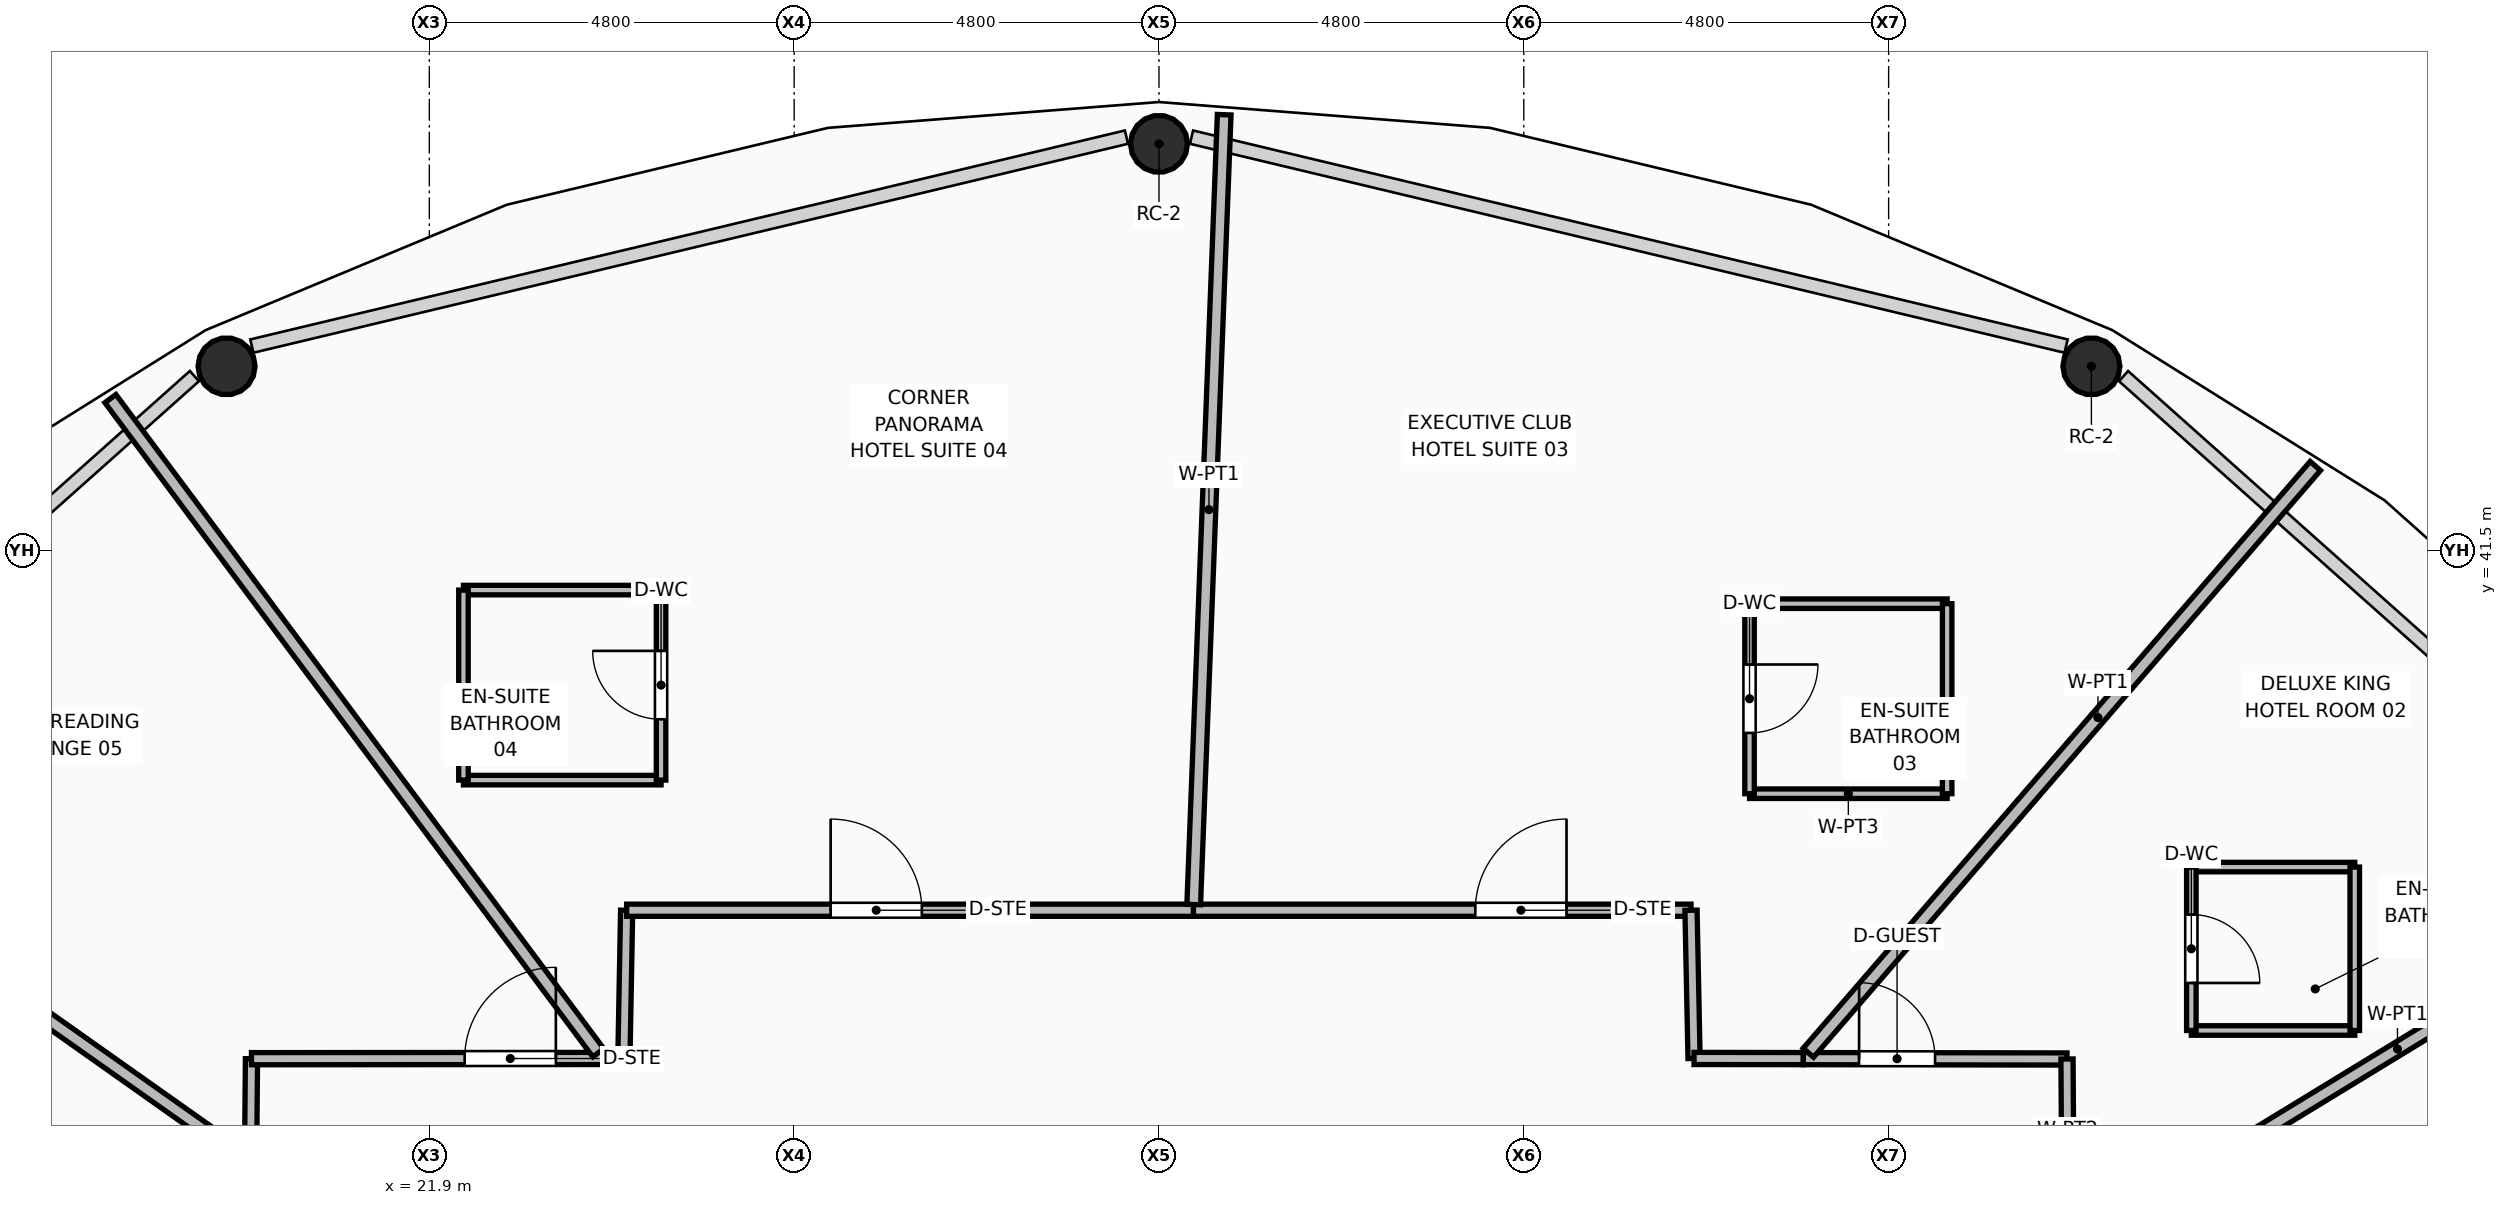
"""IFC4 building model, lengths in metres.
Left out: names, types, materials, properties, quantities, classifications, styles, units other than length and angle.
Written with IfcOpenShell. Run it as: python <this file> out.ifc"""

import sys

from ifc_helpers import new_model, si_unit, direction, frame, frame_2d, origin, origin_2d, place, context, subcontext, project, spatial, rectangle, hollow_circle, extrude, element, fill, save


model = new_model("IFC4")
c1 = context("Model", 3, precision=1e-05, world=origin(), true_north=direction((0.0, 1.0)))
c2 = subcontext(c1, "Body", "Model", "MODEL_VIEW")
j1 = project(units=[si_unit("LENGTHUNIT", "METRE"), si_unit("PLANEANGLEUNIT", "RADIAN")], contexts=[c1])
p1 = place(None, origin())
s1 = spatial("IfcSite", under=j1, at=p1, CompositionType="ELEMENT")
p2 = place(p1, origin())
s2 = spatial("IfcBuilding", under=s1, at=p2, CompositionType="ELEMENT")
p3 = place(p2, frame((0.0, 0.0, 164.7)))
s3 = spatial("IfcBuildingStorey", under=s2, at=p3, CompositionType="ELEMENT", Elevation=164.7)
for number, where, z_axis, x_axis in (
    (1, (43.768, 43.921, 0.0), (0.0, 0.0, 1.0), (1.0, 0.0, 0.0)),
    (2, (31.5, 46.848, 0.0), (0.0, 0.0, 1.0), (1.0, 0.0, 0.0)),
    (3, (19.232, 43.921, 0.0), (0.0, 0.0, 1.0), (1.0, 0.0, 0.0)),
):
    element("IfcColumn", number, at=place(p3, frame(where, z_axis=z_axis, x_axis=x_axis)), inside=s3, PredefinedType="COLUMN", context=c2, shape_type="SweptSolid", body=[
        extrude(hollow_circle(Radius=0.375, WallThickness=0.035, at=origin_2d()), origin(), (0.0, 0.0, 1.0), 3.57),
    ])
p4 = place(p3, frame((19.548, 33.445, 0.0), z_axis=(0.0, 0.0, 1.0), x_axis=(0.008751227658, 0.999961707274, 0.0)))
e4 = element("IfcWall", 4, at=p4, inside=s3, PredefinedType="PARTITIONING", context=c2, shape_type="SweptSolid", body=[
    extrude(rectangle(XDim=1.367, YDim=0.16, at=frame_2d((0.684, 0.0))), origin(), (0.0, 0.0, 1.0), 3.55),
])
p5 = place(p3, frame((19.56, 34.812, 0.0), z_axis=(0.0, 0.0, 1.0), x_axis=(0.999999821253, 0.000597907217, 0.0)))
e5 = element("IfcWall", 5, at=p5, inside=s3, PredefinedType="PARTITIONING", context=c2, shape_type="SweptSolid", body=[
    extrude(rectangle(XDim=4.9, YDim=0.16, at=frame_2d((2.45, 0.0))), origin(), (0.0, 0.0, 1.0), 3.006),
])
p6 = place(p5, frame((2.805, 0.0, 0.0)))
e6 = element("IfcOpeningElement", 6, at=p6, cuts=e5, PredefinedType="OPENING", context=c2, shape_type="SweptSolid", body=[
    extrude(rectangle(XDim=1.2, YDim=2.1, at=frame_2d((0.6, 1.05))), frame((0.0, 0.09, 0.0), z_axis=(0.0, -1.0, 0.0), x_axis=(1.0, 0.0, 0.0)), (0.0, 0.0, 1.0), 0.18),
])
p7 = place(p3, frame((24.46, 34.815, 0.0), z_axis=(0.0, 0.0, 1.0), x_axis=(0.018526930954, 0.999828361685, 0.0)))
e7 = element("IfcWall", 7, at=p7, inside=s3, PredefinedType="PARTITIONING", context=c2, shape_type="SweptSolid", body=[
    extrude(rectangle(XDim=1.95, YDim=0.16, at=frame_2d((0.975, 0.0))), origin(), (0.0, 0.0, 1.0), 3.55),
])
p8 = place(p3, frame((24.496, 36.765, 0.0), z_axis=(0.0, 0.0, 1.0), x_axis=(1.0, 0.0, 0.0)))
e8 = element("IfcWall", 8, at=p8, inside=s3, PredefinedType="PARTITIONING", context=c2, shape_type="SweptSolid", body=[
    extrude(rectangle(XDim=7.458, YDim=0.16, at=frame_2d((3.729, 0.0))), origin(), (0.0, 0.0, 1.0), 3.006),
])
p9 = place(p8, frame((2.684, 0.0, 0.0)))
e9 = element("IfcOpeningElement", 9, at=p9, cuts=e8, PredefinedType="OPENING", context=c2, shape_type="SweptSolid", body=[
    extrude(rectangle(XDim=1.2, YDim=2.1, at=frame_2d((0.6, 1.05))), frame((0.0, 0.09, 0.0), z_axis=(0.0, -1.0, 0.0), x_axis=(1.0, 0.0, 0.0)), (0.0, 0.0, 1.0), 0.18),
])
p10 = place(p3, frame((31.954, 36.765, 0.0), z_axis=(0.0, 0.0, 1.0), x_axis=(1.0, 0.0, 0.0)))
e10 = element("IfcWall", 10, at=p10, inside=s3, PredefinedType="PARTITIONING", context=c2, shape_type="SweptSolid", body=[
    extrude(rectangle(XDim=6.546, YDim=0.16, at=frame_2d((3.273, 0.0))), origin(), (0.0, 0.0, 1.0), 3.55),
])
p11 = place(p10, frame((3.708, 0.0, 0.0)))
e11 = element("IfcOpeningElement", 11, at=p11, cuts=e10, PredefinedType="OPENING", context=c2, shape_type="SweptSolid", body=[
    extrude(rectangle(XDim=1.2, YDim=2.1, at=frame_2d((0.6, 1.05))), frame((0.0, 0.09, 0.0), z_axis=(0.0, -1.0, 0.0), x_axis=(1.0, 0.0, 0.0)), (0.0, 0.0, 1.0), 0.18),
])
p12 = place(p3, frame((38.5, 36.765, 0.0), z_axis=(0.0, 0.0, 1.0), x_axis=(0.020529039459, -0.999789257063, 0.0)))
e12 = element("IfcWall", 12, at=p12, inside=s3, PredefinedType="PARTITIONING", context=c2, shape_type="SweptSolid", body=[
    extrude(rectangle(XDim=1.95, YDim=0.16, at=frame_2d((0.975, 0.0))), origin(), (0.0, 0.0, 1.0), 3.55),
])
p13 = place(p3, frame((38.54, 34.815, 0.0), z_axis=(0.0, 0.0, 1.0), x_axis=(0.999999077601, -0.001358233043, 0.0)))
e13 = element("IfcWall", 13, at=p13, inside=s3, PredefinedType="PARTITIONING", context=c2, shape_type="SweptSolid", body=[
    extrude(rectangle(XDim=1.438, YDim=0.16, at=frame_2d((0.719, 0.0))), origin(), (0.0, 0.0, 1.0), 3.55),
])
p14 = place(p3, frame((39.978, 34.813, 0.0), z_axis=(0.0, 0.0, 1.0), x_axis=(0.999999009391, -0.001407557195, 0.0)))
e14 = element("IfcWall", 14, at=p14, inside=s3, PredefinedType="PARTITIONING", context=c2, shape_type="SweptSolid", body=[
    extrude(rectangle(XDim=3.469, YDim=0.16, at=frame_2d((1.734, 0.0))), origin(), (0.0, 0.0, 1.0), 3.006),
])
p15 = place(p14, frame((0.733, 0.0, 0.0)))
e15 = element("IfcOpeningElement", 15, at=p15, cuts=e14, PredefinedType="OPENING", context=c2, shape_type="SweptSolid", body=[
    extrude(rectangle(XDim=1.0, YDim=2.1, at=frame_2d((0.5, 1.05))), frame((0.0, 0.09, 0.0), z_axis=(0.0, -1.0, 0.0), x_axis=(1.0, 0.0, 0.0)), (0.0, 0.0, 1.0), 0.18),
])
p16 = place(p3, frame((43.447, 34.808, 0.0), z_axis=(0.0, 0.0, 1.0), x_axis=(0.006526585281, -0.999978701615, 0.0)))
e16 = element("IfcWall", 16, at=p16, inside=s3, PredefinedType="PARTITIONING", context=c2, shape_type="SweptSolid", body=[
    extrude(rectangle(XDim=2.768, YDim=0.16, at=frame_2d((1.384, 0.0))), origin(), (0.0, 0.0, 1.0), 3.006),
])
p17 = place(p3, frame((43.54, 32.344, 0.0), z_axis=(0.0, 0.0, 1.0), x_axis=(0.853711993856, 0.520745457537, 0.0)))
e17 = element("IfcWall", 17, at=p17, inside=s3, PredefinedType="PARTITIONING", context=c2, shape_type="SweptSolid", body=[
    extrude(rectangle(XDim=9.968, YDim=0.18, at=frame_2d((4.984, 0.0))), origin(), (0.0, 0.0, 1.0), 2.852),
])
p18 = place(p3, frame((40.044, 34.89, 0.0), z_axis=(0.0, 0.0, 1.0), x_axis=(0.653771871809, 0.756691707125, 0.0)))
e18 = element("IfcWall", 18, at=p18, inside=s3, PredefinedType="PARTITIONING", context=c2, shape_type="SweptSolid", body=[
    extrude(rectangle(XDim=10.203, YDim=0.18, at=frame_2d((5.101, 0.0))), origin(), (0.0, 0.0, 1.0), 2.852),
])
p19 = place(p3, frame((31.957, 36.84, 0.0), z_axis=(0.0, 0.0, 1.0), x_axis=(0.038551241221, 0.999256624597, 0.0)))
e19 = element("IfcWall", 19, at=p19, inside=s3, PredefinedType="PARTITIONING", context=c2, shape_type="SweptSolid", body=[
    extrude(rectangle(XDim=10.399, YDim=0.18, at=frame_2d((5.199, 0.0))), origin(), (0.0, 0.0, 1.0), 2.852),
])
p20 = place(p3, frame((24.123, 34.89, 0.0), z_axis=(0.0, 0.0, 1.0), x_axis=(-0.597869450308, 0.80159348824, 0.0)))
e20 = element("IfcWall", 20, at=p20, inside=s3, PredefinedType="PARTITIONING", context=c2, shape_type="SweptSolid", body=[
    extrude(rectangle(XDim=10.736, YDim=0.18, at=frame_2d((5.368, 0.0))), origin(), (0.0, 0.0, 1.0), 2.852),
])
p21 = place(p3, frame((19.46, 33.507, 0.0), z_axis=(0.0, 0.0, 1.0), x_axis=(-0.816740398998, 0.577005303827, 0.0)))
e21 = element("IfcWall", 21, at=p21, inside=s3, PredefinedType="PARTITIONING", context=c2, shape_type="SweptSolid", body=[
    extrude(rectangle(XDim=9.194, YDim=0.18, at=frame_2d((4.597, 0.0))), origin(), (0.0, 0.0, 1.0), 2.852),
])
for number, where, z_axis, x_axis in (
    (22, (45.083, 35.183, 0.0), (0.0, 0.0, 1.0), (1.0, 0.0, 0.0)),
    (23, (45.083, 37.333, 0.0), (0.0, 0.0, 1.0), (1.0, 0.0, 0.0)),
):
    element("IfcWall", number, at=place(p3, frame(where, z_axis=z_axis, x_axis=x_axis)), inside=s3, PredefinedType="PARTITIONING", context=c2, shape_type="SweptSolid", body=[
        extrude(rectangle(XDim=2.15, YDim=0.125, at=frame_2d((1.075, 0.0))), origin(), (0.0, 0.0, 1.0), 3.55),
    ])
p22 = place(p3, frame((45.083, 35.183, 0.0), z_axis=(0.0, 0.0, 1.0), x_axis=(0.0, 1.0, 0.0)))
e24 = element("IfcWall", 24, at=p22, inside=s3, PredefinedType="PARTITIONING", context=c2, shape_type="SweptSolid", body=[
    extrude(rectangle(XDim=2.15, YDim=0.125, at=frame_2d((1.075, 0.0))), origin(), (0.0, 0.0, 1.0), 3.55),
])
p23 = place(p22, frame((0.625, 0.0, 0.0)))
e25 = element("IfcOpeningElement", 25, at=p23, cuts=e24, PredefinedType="OPENING", context=c2, shape_type="SweptSolid", body=[
    extrude(rectangle(XDim=0.9, YDim=2.1, at=frame_2d((0.45, 1.05))), frame((0.0, 0.073, 0.0), z_axis=(0.0, -1.0, 0.0), x_axis=(1.0, 0.0, 0.0)), (0.0, 0.0, 1.0), 0.145),
])
p24 = place(p3, frame((47.233, 35.183, 0.0), z_axis=(0.0, 0.0, 1.0), x_axis=(0.0, 1.0, 0.0)))
e26 = element("IfcWall", 26, at=p24, inside=s3, PredefinedType="PARTITIONING", context=c2, shape_type="SweptSolid", body=[
    extrude(rectangle(XDim=2.15, YDim=0.125, at=frame_2d((1.075, 0.0))), origin(), (0.0, 0.0, 1.0), 3.55),
])
for number, where, z_axis, x_axis in (
    (27, (39.27, 38.298, 0.0), (0.0, 0.0, 1.0), (1.0, 0.0, 0.0)),
    (28, (39.27, 40.798, 0.0), (0.0, 0.0, 1.0), (1.0, 0.0, 0.0)),
):
    element("IfcWall", number, at=place(p3, frame(where, z_axis=z_axis, x_axis=x_axis)), inside=s3, PredefinedType="PARTITIONING", context=c2, shape_type="SweptSolid", body=[
        extrude(rectangle(XDim=2.6, YDim=0.125, at=frame_2d((1.3, 0.0))), origin(), (0.0, 0.0, 1.0), 3.55),
    ])
p25 = place(p3, frame((39.27, 38.298, 0.0), z_axis=(0.0, 0.0, 1.0), x_axis=(0.0, 1.0, 0.0)))
e29 = element("IfcWall", 29, at=p25, inside=s3, PredefinedType="PARTITIONING", context=c2, shape_type="SweptSolid", body=[
    extrude(rectangle(XDim=2.5, YDim=0.125, at=frame_2d((1.25, 0.0))), origin(), (0.0, 0.0, 1.0), 3.55),
])
p26 = place(p25, frame((0.8, 0.0, 0.0)))
e30 = element("IfcOpeningElement", 30, at=p26, cuts=e29, PredefinedType="OPENING", context=c2, shape_type="SweptSolid", body=[
    extrude(rectangle(XDim=0.9, YDim=2.1, at=frame_2d((0.45, 1.05))), frame((0.0, 0.073, 0.0), z_axis=(0.0, -1.0, 0.0), x_axis=(1.0, 0.0, 0.0)), (0.0, 0.0, 1.0), 0.145),
])
p27 = place(p3, frame((41.87, 38.298, 0.0), z_axis=(0.0, 0.0, 1.0), x_axis=(0.0, 1.0, 0.0)))
e31 = element("IfcWall", 31, at=p27, inside=s3, PredefinedType="PARTITIONING", context=c2, shape_type="SweptSolid", body=[
    extrude(rectangle(XDim=2.5, YDim=0.125, at=frame_2d((1.25, 0.0))), origin(), (0.0, 0.0, 1.0), 3.55),
])
for number, where, z_axis, x_axis in (
    (32, (22.349, 38.477, 0.0), (0.0, 0.0, 1.0), (1.0, 0.0, 0.0)),
    (33, (22.349, 40.977, 0.0), (0.0, 0.0, 1.0), (1.0, 0.0, 0.0)),
):
    element("IfcWall", number, at=place(p3, frame(where, z_axis=z_axis, x_axis=x_axis)), inside=s3, PredefinedType="PARTITIONING", context=c2, shape_type="SweptSolid", body=[
        extrude(rectangle(XDim=2.6, YDim=0.125, at=frame_2d((1.3, 0.0))), origin(), (0.0, 0.0, 1.0), 3.55),
    ])
p28 = place(p3, frame((22.349, 38.477, 0.0), z_axis=(0.0, 0.0, 1.0), x_axis=(0.0, 1.0, 0.0)))
e34 = element("IfcWall", 34, at=p28, inside=s3, PredefinedType="PARTITIONING", context=c2, shape_type="SweptSolid", body=[
    extrude(rectangle(XDim=2.5, YDim=0.125, at=frame_2d((1.25, 0.0))), origin(), (0.0, 0.0, 1.0), 3.55),
])
p29 = place(p3, frame((24.949, 38.477, 0.0), z_axis=(0.0, 0.0, 1.0), x_axis=(0.0, 1.0, 0.0)))
e35 = element("IfcWall", 35, at=p29, inside=s3, PredefinedType="PARTITIONING", context=c2, shape_type="SweptSolid", body=[
    extrude(rectangle(XDim=2.5, YDim=0.125, at=frame_2d((1.25, 0.0))), origin(), (0.0, 0.0, 1.0), 3.55),
])
p30 = place(p29, frame((0.8, 0.0, 0.0)))
e36 = element("IfcOpeningElement", 36, at=p30, cuts=e35, PredefinedType="OPENING", context=c2, shape_type="SweptSolid", body=[
    extrude(rectangle(XDim=0.9, YDim=2.1, at=frame_2d((0.45, 1.05))), frame((0.0, 0.073, 0.0), z_axis=(0.0, -1.0, 0.0), x_axis=(1.0, 0.0, 0.0)), (0.0, 0.0, 1.0), 0.145),
])
p31 = place(p23, frame((0.9, 0.0, 0.0), z_axis=(0.0, 0.0, 1.0), x_axis=(-1.0, 0.0, 0.0)))
e37 = element("IfcDoor", 37, at=p31, inside=s3, OperationType="SINGLE_SWING_RIGHT", PredefinedType="DOOR", context=c2, shape_type="SweptSolid", body=[
    extrude(rectangle(XDim=0.9, YDim=2.1, at=frame_2d((0.45, 1.05))), frame((0.0, 0.025, 0.0), z_axis=(0.0, -1.0, 0.0), x_axis=(1.0, 0.0, 0.0)), (0.0, 0.0, 1.0), 0.05),
])
fill(e25, e37)
p32 = place(p15, origin())
e38 = element("IfcDoor", 38, at=p32, inside=s3, OperationType="SINGLE_SWING_LEFT", PredefinedType="DOOR", context=c2, shape_type="SweptSolid", body=[
    extrude(rectangle(XDim=1.0, YDim=2.1, at=frame_2d((0.5, 1.05))), frame((0.0, 0.025, 0.0), z_axis=(0.0, -1.0, 0.0), x_axis=(1.0, 0.0, 0.0)), (0.0, 0.0, 1.0), 0.05),
])
fill(e15, e38)
p33 = place(p26, frame((0.9, 0.0, 0.0), z_axis=(0.0, 0.0, 1.0), x_axis=(-1.0, 0.0, 0.0)))
e39 = element("IfcDoor", 39, at=p33, inside=s3, OperationType="SINGLE_SWING_LEFT", PredefinedType="DOOR", context=c2, shape_type="SweptSolid", body=[
    extrude(rectangle(XDim=0.9, YDim=2.1, at=frame_2d((0.45, 1.05))), frame((0.0, 0.025, 0.0), z_axis=(0.0, -1.0, 0.0), x_axis=(1.0, 0.0, 0.0)), (0.0, 0.0, 1.0), 0.05),
])
fill(e30, e39)
p34 = place(p11, origin())
e40 = element("IfcDoor", 40, at=p34, inside=s3, OperationType="SINGLE_SWING_RIGHT", PredefinedType="DOOR", context=c2, shape_type="SweptSolid", body=[
    extrude(rectangle(XDim=1.2, YDim=2.1, at=frame_2d((0.6, 1.05))), frame((0.0, 0.025, 0.0), z_axis=(0.0, -1.0, 0.0), x_axis=(1.0, 0.0, 0.0)), (0.0, 0.0, 1.0), 0.05),
])
fill(e11, e40)
p35 = place(p30, origin())
e41 = element("IfcDoor", 41, at=p35, inside=s3, OperationType="SINGLE_SWING_RIGHT", PredefinedType="DOOR", context=c2, shape_type="SweptSolid", body=[
    extrude(rectangle(XDim=0.9, YDim=2.1, at=frame_2d((0.45, 1.05))), frame((0.0, 0.025, 0.0), z_axis=(0.0, -1.0, 0.0), x_axis=(1.0, 0.0, 0.0)), (0.0, 0.0, 1.0), 0.05),
])
fill(e36, e41)
p36 = place(p9, origin())
e42 = element("IfcDoor", 42, at=p36, inside=s3, OperationType="SINGLE_SWING_LEFT", PredefinedType="DOOR", context=c2, shape_type="SweptSolid", body=[
    extrude(rectangle(XDim=1.2, YDim=2.1, at=frame_2d((0.6, 1.05))), frame((0.0, 0.025, 0.0), z_axis=(0.0, -1.0, 0.0), x_axis=(1.0, 0.0, 0.0)), (0.0, 0.0, 1.0), 0.05),
])
fill(e9, e42)
p37 = place(p6, origin())
e43 = element("IfcDoor", 43, at=p37, inside=s3, OperationType="SINGLE_SWING_RIGHT", PredefinedType="DOOR", context=c2, shape_type="SweptSolid", body=[
    extrude(rectangle(XDim=1.2, YDim=2.1, at=frame_2d((0.6, 1.05))), frame((0.0, 0.025, 0.0), z_axis=(0.0, -1.0, 0.0), x_axis=(1.0, 0.0, 0.0)), (0.0, 0.0, 1.0), 0.05),
])
fill(e6, e43)
save(model, sys.argv[1])
